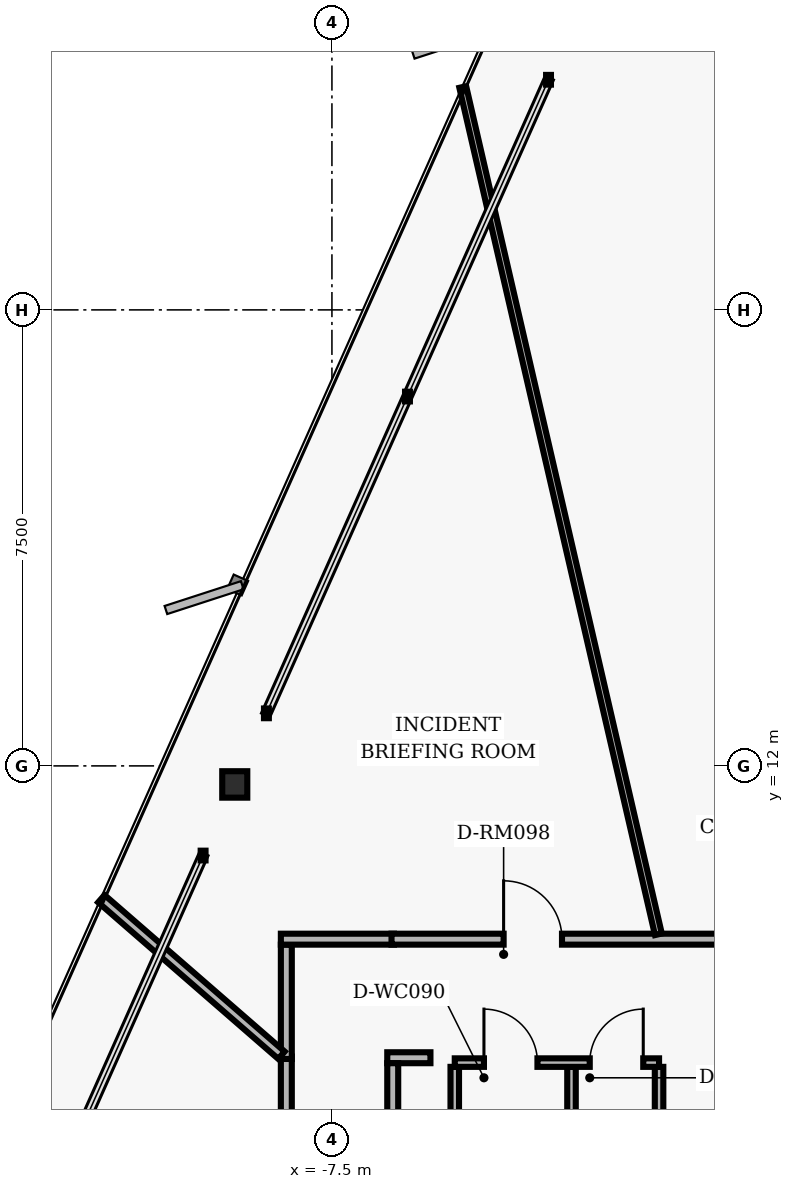
"""IFC4 building model, lengths in metres.
Left out: names, types, materials, properties, quantities, classifications, styles, units other than length and angle.
Written with IfcOpenShell. Run it as: python <this file> out.ifc"""

import sys

from ifc_helpers import new_model, si_unit, direction, frame, frame_2d, origin, origin_2d, place, context, subcontext, project, spatial, rectangle, i_section, extrude, element, fill, save


model = new_model("IFC4")
c1 = context("Model", 3, precision=1e-05, world=origin(), true_north=direction((0.0, 1.0)))
c2 = subcontext(c1, "Body", "Model", "MODEL_VIEW")
j1 = project(units=[si_unit("LENGTHUNIT", "METRE"), si_unit("PLANEANGLEUNIT", "RADIAN")], contexts=[c1])
p1 = place(None, origin())
s1 = spatial("IfcSite", under=j1, at=p1, CompositionType="ELEMENT")
p2 = place(p1, origin())
s2 = spatial("IfcBuilding", under=s1, at=p2, CompositionType="ELEMENT")
p3 = place(p2, frame((0.0, 0.0, 113.76)))
s3 = spatial("IfcBuildingStorey", under=s2, at=p3, CompositionType="ELEMENT", Elevation=113.76)
p4 = place(p3, frame((-9.098, 11.695, 0.0), z_axis=(0.0, 0.0, 1.0), x_axis=(1.0, 0.0, 0.0)))
e1 = element("IfcColumn", 1, at=p4, inside=s3, PredefinedType="COLUMN", context=c2, shape_type="SweptSolid", body=[
    extrude(i_section(OverallWidth=0.412, OverallDepth=0.435, WebThickness=0.036, FlangeThickness=0.057, FilletRadius=0.022, at=origin_2d()), origin(), (0.0, 0.0, 1.0), 3.04),
])
for number, where, z_axis, x_axis in (
    (2, (-5.48, 4.95, 0.0), (0.0, 0.0, 1.0), (0.0, 1.0, 0.0)),
    (3, (-3.56, 4.95, 0.0), (0.0, 0.0, 1.0), (0.0, 1.0, 0.0)),
    (4, (-2.12, 4.95, 0.0), (0.0, 0.0, 1.0), (0.0, 1.0, 0.0)),
):
    element("IfcWall", number, at=place(p3, frame(where, z_axis=z_axis, x_axis=x_axis)), inside=s3, PredefinedType="PARTITIONING", context=c2, shape_type="SweptSolid", body=[
        extrude(rectangle(XDim=2.1, YDim=0.14, at=frame_2d((1.05, 0.0))), origin(), (0.0, 0.0, 1.0), 2.763),
    ])
p5 = place(p3, frame((-5.48, 7.12, 0.0), z_axis=(0.0, 0.0, 1.0), x_axis=(1.0, 0.0, 0.0)))
e5 = element("IfcWall", 5, at=p5, inside=s3, PredefinedType="PARTITIONING", context=c2, shape_type="SweptSolid", body=[
    extrude(rectangle(XDim=3.36, YDim=0.14, at=frame_2d((1.68, 0.0))), origin(), (0.0, 0.0, 1.0), 2.763),
])
p6 = place(p5, frame((0.48, 0.0, 0.0)))
e6 = element("IfcOpeningElement", 6, at=p6, cuts=e5, PredefinedType="OPENING", context=c2, shape_type="SweptSolid", body=[
    extrude(rectangle(XDim=0.88, YDim=2.02, at=frame_2d((0.44, 1.01))), frame((0.0, 0.08, 0.0), z_axis=(0.0, -1.0, 0.0), x_axis=(1.0, 0.0, 0.0)), (0.0, 0.0, 1.0), 0.16),
])
p7 = place(p5, frame((2.22, 0.0, 0.0)))
e7 = element("IfcOpeningElement", 7, at=p7, cuts=e5, PredefinedType="OPENING", context=c2, shape_type="SweptSolid", body=[
    extrude(rectangle(XDim=0.88, YDim=2.02, at=frame_2d((0.44, 1.01))), frame((0.0, 0.08, 0.0), z_axis=(0.0, -1.0, 0.0), x_axis=(1.0, 0.0, 0.0)), (0.0, 0.0, 1.0), 0.16),
])
p8 = place(p3, frame((-8.25, -7.22, 0.0), z_axis=(0.0, 0.0, 1.0), x_axis=(0.0, 1.0, 0.0)))
e8 = element("IfcWall", 8, at=p8, inside=s3, PredefinedType="PARTITIONING", context=c2, shape_type="SweptSolid", body=[
    extrude(rectangle(XDim=14.44, YDim=0.18, at=frame_2d((7.22, 0.0))), origin(), (0.0, 0.0, 1.0), 2.33),
])
p9 = place(p8, frame((6.665, 0.0, 0.0)))
e9 = element("IfcOpeningElement", 9, at=p9, cuts=e8, PredefinedType="OPENING", context=c2, shape_type="SweptSolid", body=[
    extrude(rectangle(XDim=0.96, YDim=2.02, at=frame_2d((0.48, 1.01))), frame((0.0, 0.1, 0.0), z_axis=(0.0, -1.0, 0.0), x_axis=(1.0, 0.0, 0.0)), (0.0, 0.0, 1.0), 0.2),
])
p10 = place(p8, frame((2.525, 0.0, 0.0)))
e10 = element("IfcOpeningElement", 10, at=p10, cuts=e8, PredefinedType="OPENING", context=c2, shape_type="SweptSolid", body=[
    extrude(rectangle(XDim=0.96, YDim=2.02, at=frame_2d((0.48, 1.01))), frame((0.0, 0.1, 0.0), z_axis=(0.0, -1.0, 0.0), x_axis=(1.0, 0.0, 0.0)), (0.0, 0.0, 1.0), 0.2),
])
p11 = place(p8, frame((10.88, 0.0, 0.0)))
e11 = element("IfcOpeningElement", 11, at=p11, cuts=e8, PredefinedType="OPENING", context=c2, shape_type="SweptSolid", body=[
    extrude(rectangle(XDim=0.96, YDim=2.02, at=frame_2d((0.48, 1.01))), frame((0.0, 0.1, 0.0), z_axis=(0.0, -1.0, 0.0), x_axis=(1.0, 0.0, 0.0)), (0.0, 0.0, 1.0), 0.2),
])
p12 = place(p3, frame((-8.25, 7.18, 0.0), z_axis=(0.0, 0.0, 1.0), x_axis=(0.0, 1.0, 0.0)))
e12 = element("IfcWall", 12, at=p12, inside=s3, PredefinedType="PARTITIONING", context=c2, shape_type="SweptSolid", body=[
    extrude(rectangle(XDim=1.88, YDim=0.18, at=frame_2d((0.94, 0.0))), origin(), (0.0, 0.0, 1.0), 2.763),
])
p13 = place(p3, frame((-8.34, 9.15, 0.0), z_axis=(0.0, 0.0, 1.0), x_axis=(1.0, 0.0, 0.0)))
e13 = element("IfcWall", 13, at=p13, inside=s3, PredefinedType="PARTITIONING", context=c2, shape_type="SweptSolid", body=[
    extrude(rectangle(XDim=1.86, YDim=0.18, at=frame_2d((0.93, 0.0))), origin(), (0.0, 0.0, 1.0), 2.763),
])
p14 = place(p3, frame((-6.52, 9.15, 0.0), z_axis=(0.0, 0.0, 1.0), x_axis=(1.0, 0.0, 0.0)))
e14 = element("IfcWall", 14, at=p14, inside=s3, PredefinedType="PARTITIONING", context=c2, shape_type="SweptSolid", body=[
    extrude(rectangle(XDim=16.82, YDim=0.18, at=frame_2d((8.41, 0.0))), origin(), (0.0, 0.0, 1.0), 2.763),
])
p15 = place(p14, frame((13.022, 0.0, 0.0)))
e15 = element("IfcOpeningElement", 15, at=p15, cuts=e14, PredefinedType="OPENING", context=c2, shape_type="SweptSolid", body=[
    extrude(rectangle(XDim=0.96, YDim=2.02, at=frame_2d((0.48, 1.01))), frame((0.0, 0.1, 0.0), z_axis=(0.0, -1.0, 0.0), x_axis=(1.0, 0.0, 0.0)), (0.0, 0.0, 1.0), 0.2),
])
p16 = place(p14, frame((6.934, 0.0, 0.0)))
e16 = element("IfcOpeningElement", 16, at=p16, cuts=e14, PredefinedType="OPENING", context=c2, shape_type="SweptSolid", body=[
    extrude(rectangle(XDim=0.96, YDim=2.02, at=frame_2d((0.48, 1.01))), frame((0.0, 0.1, 0.0), z_axis=(0.0, -1.0, 0.0), x_axis=(1.0, 0.0, 0.0)), (0.0, 0.0, 1.0), 0.2),
])
p17 = place(p14, frame((1.844, 0.0, 0.0)))
e17 = element("IfcOpeningElement", 17, at=p17, cuts=e14, PredefinedType="OPENING", context=c2, shape_type="SweptSolid", body=[
    extrude(rectangle(XDim=0.96, YDim=2.02, at=frame_2d((0.48, 1.01))), frame((0.0, 0.1, 0.0), z_axis=(0.0, -1.0, 0.0), x_axis=(1.0, 0.0, 0.0)), (0.0, 0.0, 1.0), 0.2),
])
p18 = place(p3, frame((-5.88, 7.2, 0.0), z_axis=(0.0, 0.0, 1.0), x_axis=(-1.0, 0.0, 0.0)))
e18 = element("IfcWall", 18, at=p18, inside=s3, PredefinedType="PARTITIONING", context=c2, shape_type="SweptSolid", body=[
    extrude(rectangle(XDim=0.71, YDim=0.18, at=frame_2d((0.355, 0.0))), origin(), (0.0, 0.0, 1.0), 2.763),
])
p19 = place(p3, frame((-6.5, 7.11, 0.0), z_axis=(0.0, 0.0, 1.0), x_axis=(0.0, -1.0, 0.0)))
e19 = element("IfcWall", 19, at=p19, inside=s3, PredefinedType="PARTITIONING", context=c2, shape_type="SweptSolid", body=[
    extrude(rectangle(XDim=2.058, YDim=0.18, at=frame_2d((1.029, 0.0))), origin(), (0.0, 0.0, 1.0), 2.763),
])
p20 = place(p3, frame((-2.131, 9.23, 0.0), z_axis=(0.0, 0.0, 1.0), x_axis=(-0.224960484743, 0.974367887558, 0.0)))
e20 = element("IfcWall", 20, at=p20, inside=s3, PredefinedType="MOVABLE", context=c2, shape_type="SweptSolid", body=[
    extrude(rectangle(XDim=14.303, YDim=0.115, at=frame_2d((7.151, 0.0))), origin(), (0.0, 0.0, 1.0), 2.763),
])
p21 = place(p3, frame((-8.33, 7.241, 0.0), z_axis=(0.0, 0.0, 1.0), x_axis=(-0.754715330954, 0.656052413472, 0.0)))
e21 = element("IfcWall", 21, at=p21, inside=s3, PredefinedType="PARTITIONING", context=c2, shape_type="SweptSolid", body=[
    extrude(rectangle(XDim=3.925, YDim=0.16, at=frame_2d((1.962, 0.0))), origin(), (0.0, 0.0, 1.0), 2.763),
])
p22 = place(p6, origin())
e22 = element("IfcDoor", 22, at=p22, inside=s3, OperationType="SINGLE_SWING_LEFT", PredefinedType="DOOR", context=c2, shape_type="SweptSolid", body=[
    extrude(rectangle(XDim=0.88, YDim=2.02, at=frame_2d((0.44, 1.01))), frame((0.0, 0.025, 0.0), z_axis=(0.0, -1.0, 0.0), x_axis=(1.0, 0.0, 0.0)), (0.0, 0.0, 1.0), 0.05),
])
fill(e6, e22)
p23 = place(p7, origin())
e23 = element("IfcDoor", 23, at=p23, inside=s3, OperationType="SINGLE_SWING_RIGHT", PredefinedType="DOOR", context=c2, shape_type="SweptSolid", body=[
    extrude(rectangle(XDim=0.88, YDim=2.02, at=frame_2d((0.44, 1.01))), frame((0.0, 0.025, 0.0), z_axis=(0.0, -1.0, 0.0), x_axis=(1.0, 0.0, 0.0)), (0.0, 0.0, 1.0), 0.05),
])
fill(e7, e23)
p24 = place(p17, origin())
e24 = element("IfcDoor", 24, at=p24, inside=s3, OperationType="SINGLE_SWING_LEFT", PredefinedType="DOOR", context=c2, shape_type="SweptSolid", body=[
    extrude(rectangle(XDim=0.96, YDim=2.02, at=frame_2d((0.48, 1.01))), frame((0.0, 0.025, 0.0), z_axis=(0.0, -1.0, 0.0), x_axis=(1.0, 0.0, 0.0)), (0.0, 0.0, 1.0), 0.05),
])
fill(e17, e24)
save(model, sys.argv[1])
